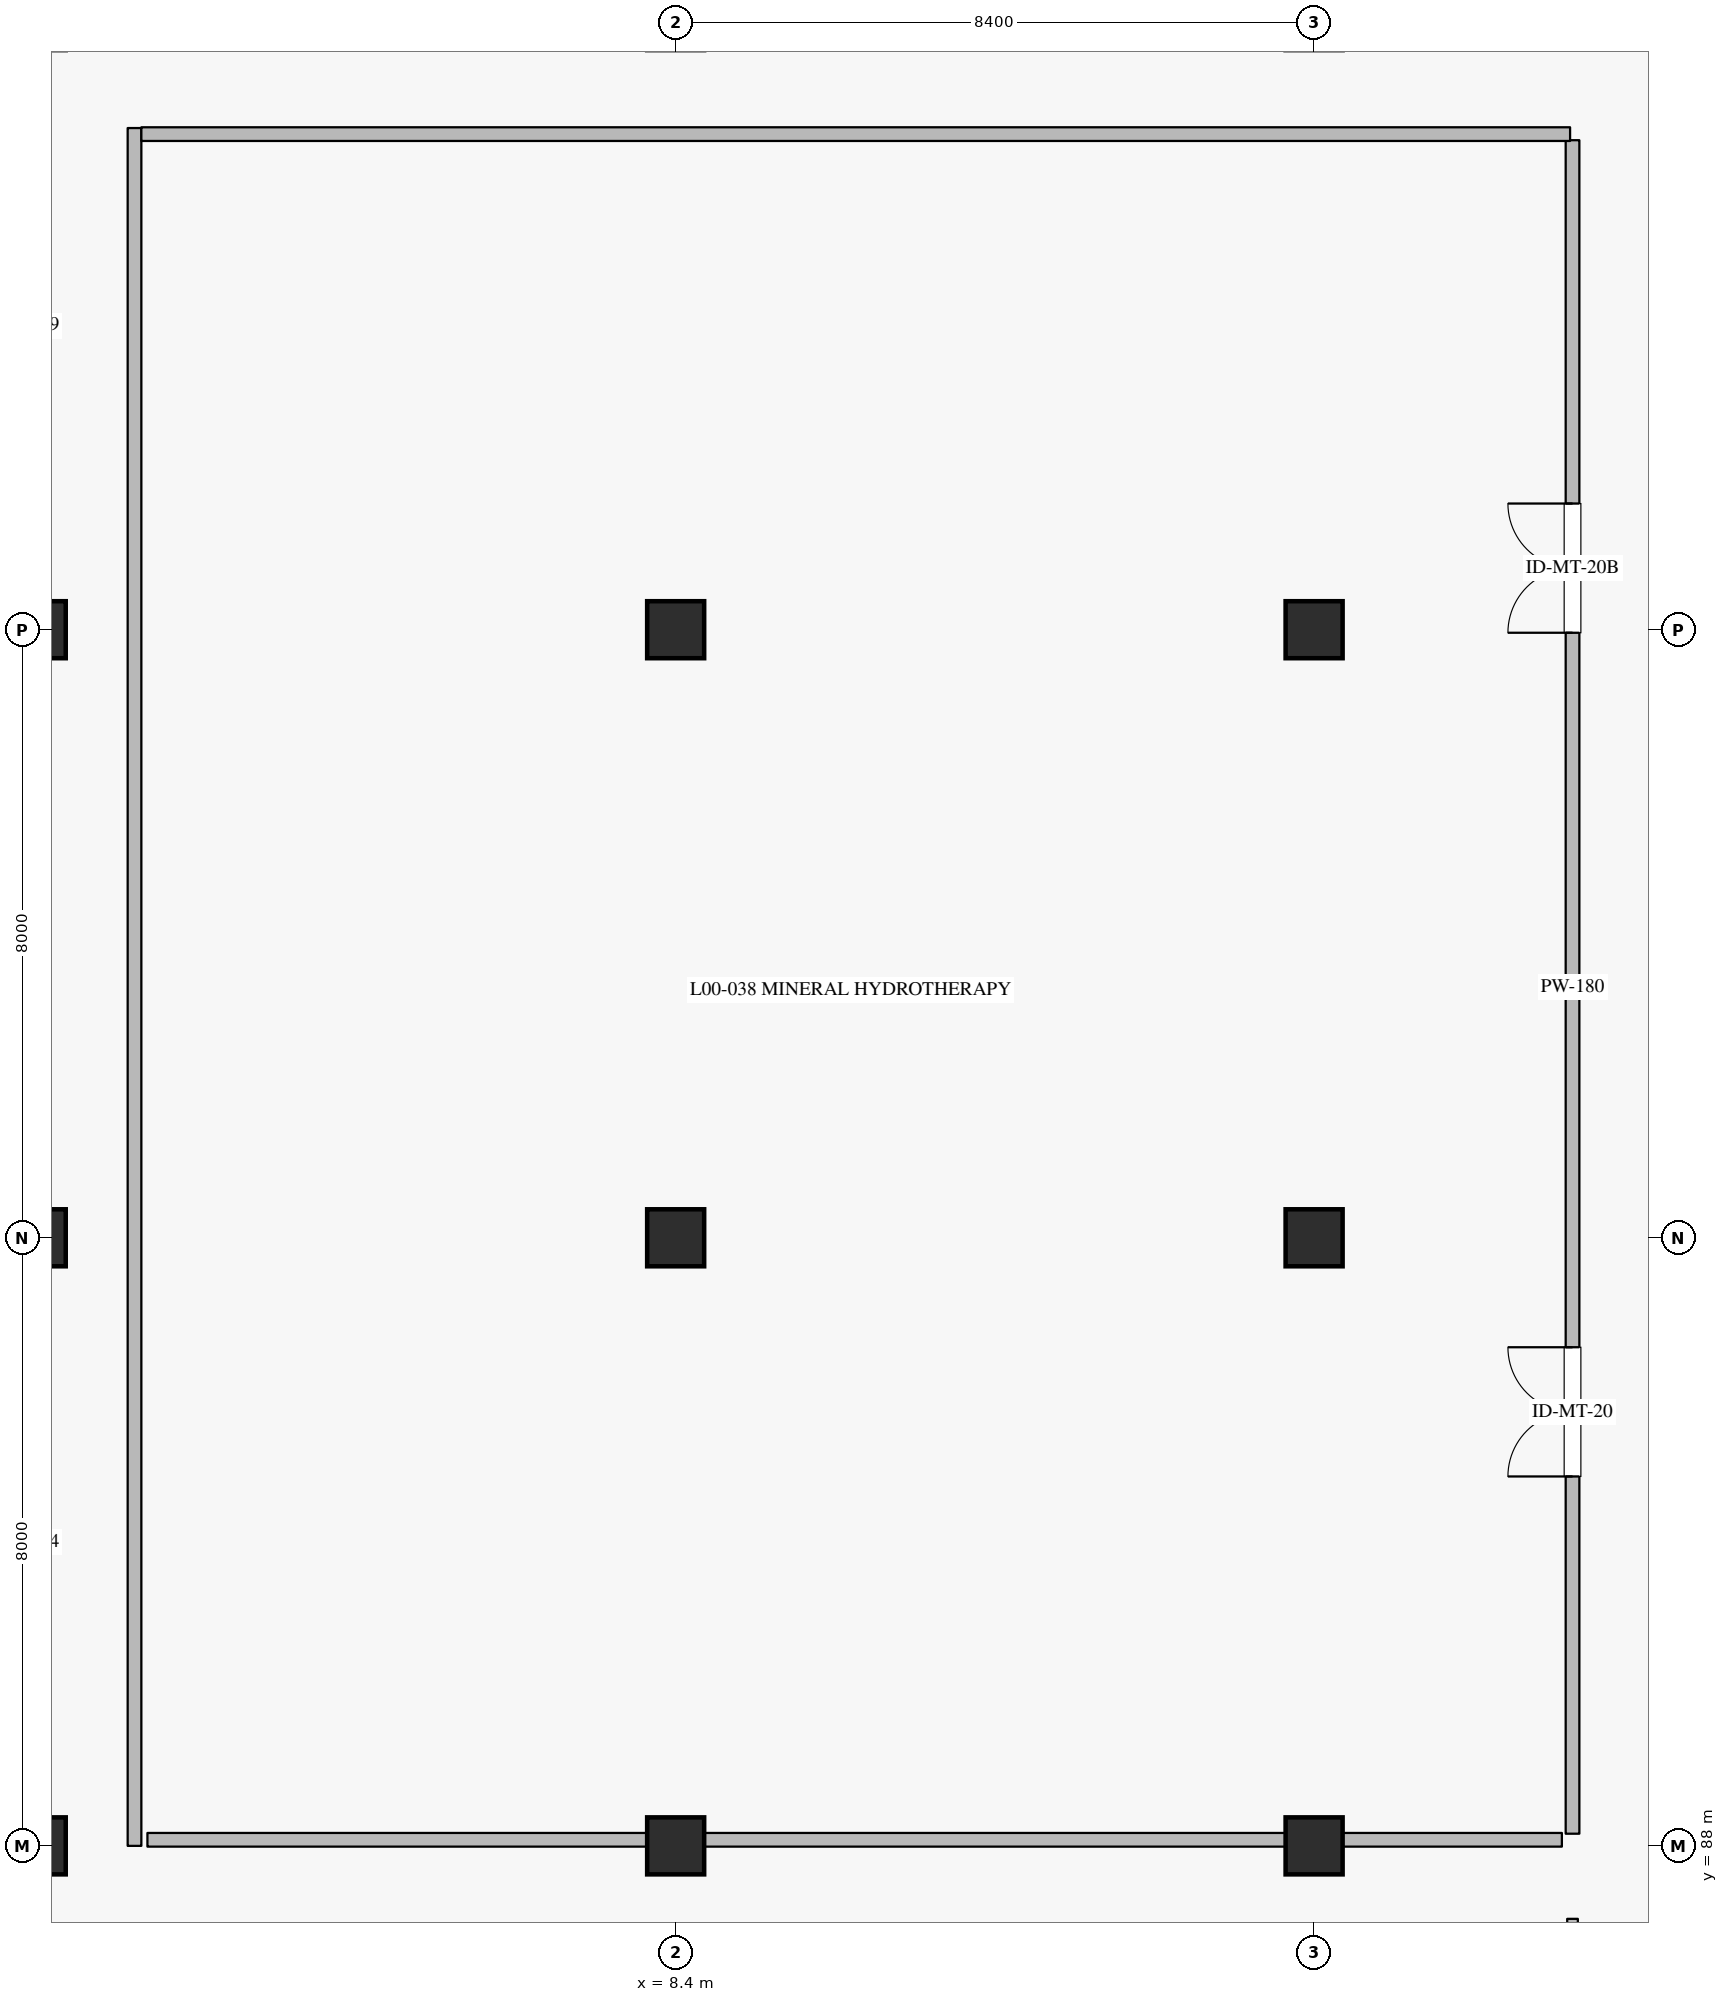
"""IFC4 building model, lengths in metres.
Left out: names, types, materials, properties, quantities, classifications, styles, units other than length and angle.
Written with IfcOpenShell. Run it as: python <this file> out.ifc"""

import sys

from ifc_helpers import new_model, si_unit, direction, frame, frame_2d, origin, origin_2d, place, context, subcontext, project, spatial, rectangle, extrude, element, fill, save


model = new_model("IFC4")
c1 = context("Model", 3, precision=1e-05, world=origin(), true_north=direction((0.0, 1.0)))
c2 = subcontext(c1, "Body", "Model", "MODEL_VIEW")
j1 = project(units=[si_unit("LENGTHUNIT", "METRE"), si_unit("PLANEANGLEUNIT", "RADIAN")], contexts=[c1])
p1 = place(None, origin())
s1 = spatial("IfcSite", under=j1, at=p1, CompositionType="ELEMENT")
p2 = place(p1, origin())
s2 = spatial("IfcBuilding", under=s1, at=p2, CompositionType="ELEMENT")
p3 = place(p2, origin())
s3 = spatial("IfcBuildingStorey", under=s2, at=p3, CompositionType="ELEMENT", Elevation=0.0)
for number, where, z_axis, x_axis in (
    (1, (0.0, 88.0, 0.0), (0.0, 0.0, 1.0), (1.0, 0.0, 0.0)),
    (2, (0.0, 96.0, 0.0), (0.0, 0.0, 1.0), (1.0, 0.0, 0.0)),
    (3, (0.0, 104.0, 0.0), (0.0, 0.0, 1.0), (1.0, 0.0, 0.0)),
    (4, (8.4, 88.0, 0.0), (0.0, 0.0, 1.0), (1.0, 0.0, 0.0)),
    (5, (8.4, 96.0, 0.0), (0.0, 0.0, 1.0), (1.0, 0.0, 0.0)),
    (6, (8.4, 104.0, 0.0), (0.0, 0.0, 1.0), (1.0, 0.0, 0.0)),
    (7, (16.8, 88.0, 0.0), (0.0, 0.0, 1.0), (1.0, 0.0, 0.0)),
    (8, (16.8, 96.0, 0.0), (0.0, 0.0, 1.0), (1.0, 0.0, 0.0)),
    (9, (16.8, 104.0, 0.0), (0.0, 0.0, 1.0), (1.0, 0.0, 0.0)),
):
    element("IfcColumn", number, at=place(p3, frame(where, z_axis=z_axis, x_axis=x_axis)), inside=s3, PredefinedType="COLUMN", context=c2, shape_type="SweptSolid", body=[
        extrude(rectangle(XDim=0.75, YDim=0.75, at=origin_2d()), origin(), (0.0, 0.0, 1.0), 6.0),
    ])
p4 = place(p3, frame((20.2, 65.36, 0.0), z_axis=(0.0, 0.0, 1.0), x_axis=(0.0, 1.0, 0.0)))
e10 = element("IfcWall", 10, at=p4, inside=s3, PredefinedType="PARTITIONING", context=c2, shape_type="SweptSolid", body=[
    extrude(rectangle(XDim=21.68, YDim=0.14, at=frame_2d((10.84, 0.0))), origin(), (0.0, 0.0, 1.0), 5.675),
])
p5 = place(p4, frame((9.89, 0.0, 0.0)))
e11 = element("IfcOpeningElement", 11, at=p5, cuts=e10, PredefinedType="OPENING", context=c2, shape_type="SweptSolid", body=[
    extrude(rectangle(XDim=1.9, YDim=2.4, at=frame_2d((0.95, 1.2))), frame((0.0, 0.08, 0.0), z_axis=(0.0, -1.0, 0.0), x_axis=(1.0, 0.0, 0.0)), (0.0, 0.0, 1.0), 0.16),
])
p6 = place(p3, frame((20.2, 88.16, 0.0), z_axis=(0.0, 0.0, 1.0), x_axis=(0.0, 1.0, 0.0)))
e12 = element("IfcWall", 12, at=p6, inside=s3, PredefinedType="PARTITIONING", context=c2, shape_type="SweptSolid", body=[
    extrude(rectangle(XDim=22.28, YDim=0.18, at=frame_2d((11.14, 0.0))), origin(), (0.0, 0.0, 1.0), 5.675),
])
p7 = place(p6, frame((4.7, 0.0, 0.0)))
e13 = element("IfcOpeningElement", 13, at=p7, cuts=e12, PredefinedType="OPENING", context=c2, shape_type="SweptSolid", body=[
    extrude(rectangle(XDim=1.7, YDim=2.3, at=frame_2d((0.85, 1.15))), frame((0.0, 0.1, 0.0), z_axis=(0.0, -1.0, 0.0), x_axis=(1.0, 0.0, 0.0)), (0.0, 0.0, 1.0), 0.2),
])
p8 = place(p6, frame((15.8, 0.0, 0.0)))
e14 = element("IfcOpeningElement", 14, at=p8, cuts=e12, PredefinedType="OPENING", context=c2, shape_type="SweptSolid", body=[
    extrude(rectangle(XDim=1.7, YDim=2.3, at=frame_2d((0.85, 1.15))), frame((0.0, 0.1, 0.0), z_axis=(0.0, -1.0, 0.0), x_axis=(1.0, 0.0, 0.0)), (0.0, 0.0, 1.0), 0.2),
])
p9 = place(p3, frame((1.45, 88.08, 0.0), z_axis=(0.0, 0.0, 1.0), x_axis=(1.0, 0.0, 0.0)))
e15 = element("IfcWall", 15, at=p9, inside=s3, PredefinedType="PARTITIONING", context=c2, shape_type="SweptSolid", body=[
    extrude(rectangle(XDim=18.61, YDim=0.18, at=frame_2d((9.305, 0.0))), origin(), (0.0, 0.0, 1.0), 4.85),
])
p10 = place(p3, frame((1.28, 88.0, 0.0), z_axis=(0.0, 0.0, 1.0), x_axis=(0.0, 1.0, 0.0)))
e16 = element("IfcWall", 16, at=p10, inside=s3, PredefinedType="PARTITIONING", context=c2, shape_type="SweptSolid", body=[
    extrude(rectangle(XDim=22.6, YDim=0.18, at=frame_2d((11.3, 0.0))), origin(), (0.0, 0.0, 1.0), 5.675),
])
p11 = place(p3, frame((1.37, 110.52, 0.0), z_axis=(0.0, 0.0, 1.0), x_axis=(1.0, 0.0, 0.0)))
e17 = element("IfcWall", 17, at=p11, inside=s3, PredefinedType="PARTITIONING", context=c2, shape_type="SweptSolid", body=[
    extrude(rectangle(XDim=18.798, YDim=0.18, at=frame_2d((9.399, 0.0))), origin(), (0.0, 0.0, 1.0), 5.675),
])
p12 = place(p7, origin())
e18 = element("IfcDoor", 18, at=p12, inside=s3, OperationType="DOUBLE_DOOR_SINGLE_SWING", PredefinedType="DOOR", context=c2, shape_type="SweptSolid", body=[
    extrude(rectangle(XDim=1.7, YDim=2.3, at=frame_2d((0.85, 1.15))), frame((0.0, 0.025, 0.0), z_axis=(0.0, -1.0, 0.0), x_axis=(1.0, 0.0, 0.0)), (0.0, 0.0, 1.0), 0.05),
])
fill(e13, e18)
p13 = place(p8, origin())
e19 = element("IfcDoor", 19, at=p13, inside=s3, OperationType="DOUBLE_DOOR_SINGLE_SWING", PredefinedType="DOOR", context=c2, shape_type="SweptSolid", body=[
    extrude(rectangle(XDim=1.7, YDim=2.3, at=frame_2d((0.85, 1.15))), frame((0.0, 0.025, 0.0), z_axis=(0.0, -1.0, 0.0), x_axis=(1.0, 0.0, 0.0)), (0.0, 0.0, 1.0), 0.05),
])
fill(e14, e19)
save(model, sys.argv[1])
